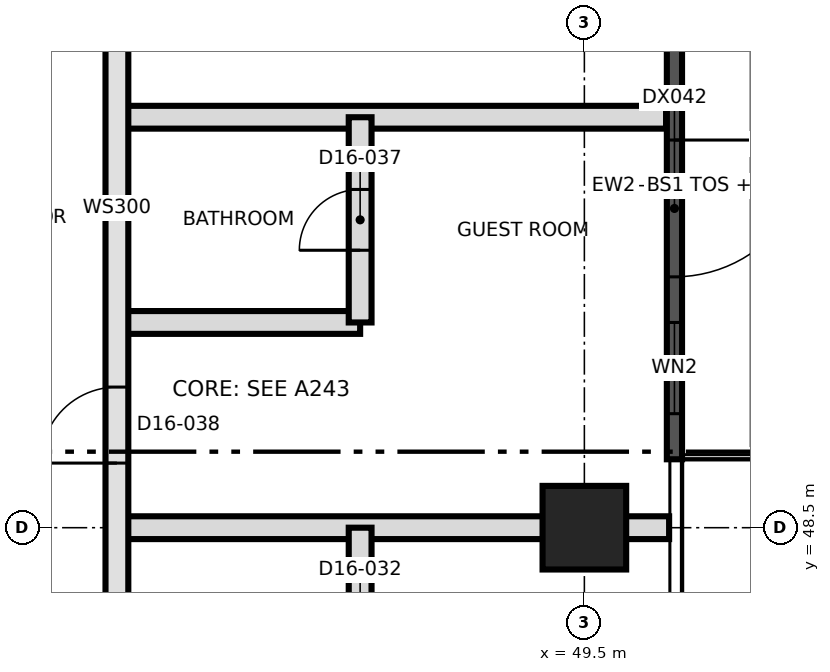
"""IFC4 building model, lengths in metres.
Left out: names, types, materials, properties, quantities, classifications, styles, units other than length and angle.
Written with IfcOpenShell. Run it as: python <this file> out.ifc"""

import sys

from ifc_helpers import new_model, si_unit, direction, frame, frame_2d, origin, origin_2d, place, context, subcontext, project, spatial, rectangle, extrude, element, fill, save


model = new_model("IFC4")
c1 = context("Model", 3, precision=1e-05, world=origin(), true_north=direction((0.0, 1.0)))
c2 = subcontext(c1, "Body", "Model", "MODEL_VIEW")
j1 = project(units=[si_unit("LENGTHUNIT", "METRE"), si_unit("PLANEANGLEUNIT", "RADIAN")], contexts=[c1])
p1 = place(None, origin())
s1 = spatial("IfcSite", under=j1, at=p1, CompositionType="ELEMENT")
p2 = place(p1, origin())
s2 = spatial("IfcBuilding", under=s1, at=p2, CompositionType="ELEMENT")
p3 = place(p2, frame((0.0, 0.0, 164.4)))
s3 = spatial("IfcBuildingStorey", under=s2, at=p3, CompositionType="ELEMENT", Elevation=164.4)
p4 = place(p3, frame((49.5, 48.5, 0.0), z_axis=(0.0, 0.0, 1.0), x_axis=(1.0, 0.0, 0.0)))
e1 = element("IfcColumn", 1, at=p4, inside=s3, PredefinedType="COLUMN", context=c2, shape_type="SweptSolid", body=[
    extrude(rectangle(XDim=1.1, YDim=1.1, at=origin_2d()), origin(), (0.0, 0.0, 1.0), 3.7),
])
p5 = place(p3, frame((50.685, 56.6, 0.0), z_axis=(0.0, 0.0, 1.0), x_axis=(0.0, -1.0, 0.0)))
e2 = element("IfcWall", 2, at=p5, inside=s3, PredefinedType="SOLIDWALL", context=c2, shape_type="SweptSolid", body=[
    extrude(rectangle(XDim=7.2, YDim=0.2, at=frame_2d((3.6, 0.0))), origin(), (0.0, 0.0, 1.0), 3.4),
])
p6 = place(p5, frame((3.0, 0.0, 0.0)))
e3 = element("IfcOpeningElement", 3, at=p6, cuts=e2, PredefinedType="OPENING", context=c2, shape_type="SweptSolid", body=[
    extrude(rectangle(XDim=1.8, YDim=2.4, at=frame_2d((0.9, 1.2))), frame((0.0, 0.11, 0.0), z_axis=(0.0, -1.0, 0.0), x_axis=(1.0, 0.0, 0.0)), (0.0, 0.0, 1.0), 0.22),
])
p7 = place(p5, frame((5.4, 0.0, 0.9)))
e4 = element("IfcOpeningElement", 4, at=p7, cuts=e2, PredefinedType="OPENING", context=c2, shape_type="SweptSolid", body=[
    extrude(rectangle(XDim=1.2, YDim=2.1, at=frame_2d((0.6, 1.05))), frame((0.0, 0.11, 0.0), z_axis=(0.0, -1.0, 0.0), x_axis=(1.0, 0.0, 0.0)), (0.0, 0.0, 1.0), 0.22),
])
p8 = place(p5, frame((0.6, 0.0, 0.9)))
e5 = element("IfcOpeningElement", 5, at=p8, cuts=e2, PredefinedType="OPENING", context=c2, shape_type="SweptSolid", body=[
    extrude(rectangle(XDim=1.2, YDim=2.1, at=frame_2d((0.6, 1.05))), frame((0.0, 0.11, 0.0), z_axis=(0.0, -1.0, 0.0), x_axis=(1.0, 0.0, 0.0)), (0.0, 0.0, 1.0), 0.22),
])
p9 = place(p3, frame((43.35, 48.5, 0.0), z_axis=(0.0, 0.0, 1.0), x_axis=(1.0, 0.0, 0.0)))
e6 = element("IfcWall", 6, at=p9, inside=s3, PredefinedType="PARTITIONING", context=c2, shape_type="SweptSolid", body=[
    extrude(rectangle(XDim=7.265, YDim=0.3, at=frame_2d((3.632, 0.0))), origin(), (0.0, 0.0, 1.0), 3.4),
])
p10 = place(p3, frame((43.35, 51.2, 0.0), z_axis=(0.0, 0.0, 1.0), x_axis=(1.0, 0.0, 0.0)))
e7 = element("IfcWall", 7, at=p10, inside=s3, PredefinedType="PARTITIONING", context=c2, shape_type="SweptSolid", body=[
    extrude(rectangle(XDim=3.2, YDim=0.3, at=frame_2d((1.6, 0.0))), origin(), (0.0, 0.0, 1.0), 3.4),
])
p11 = place(p3, frame((43.35, 53.9, 0.0), z_axis=(0.0, 0.0, 1.0), x_axis=(1.0, 0.0, 0.0)))
e8 = element("IfcWall", 8, at=p11, inside=s3, PredefinedType="PARTITIONING", context=c2, shape_type="SweptSolid", body=[
    extrude(rectangle(XDim=7.225, YDim=0.3, at=frame_2d((3.612, 0.0))), origin(), (0.0, 0.0, 1.0), 3.4),
])
p12 = place(p3, frame((43.35, 39.65, 0.0), z_axis=(0.0, 0.0, 1.0), x_axis=(0.0, 1.0, 0.0)))
e9 = element("IfcWall", 9, at=p12, inside=s3, PredefinedType="SOLIDWALL", context=c2, shape_type="SweptSolid", body=[
    extrude(rectangle(XDim=26.1, YDim=0.3, at=frame_2d((13.05, 0.0))), origin(), (0.0, 0.0, 1.0), 3.4),
])
p13 = place(p12, frame((0.985, 0.0, 0.0)))
e10 = element("IfcOpeningElement", 10, at=p13, cuts=e9, PredefinedType="OPENING", context=c2, shape_type="SweptSolid", body=[
    extrude(rectangle(XDim=1.2, YDim=2.1, at=frame_2d((0.6, 1.05))), frame((0.0, 0.16, 0.0), z_axis=(0.0, -1.0, 0.0), x_axis=(1.0, 0.0, 0.0)), (0.0, 0.0, 1.0), 0.32),
])
p14 = place(p12, frame((4.235, 0.0, 0.0)))
e11 = element("IfcOpeningElement", 11, at=p14, cuts=e9, PredefinedType="OPENING", context=c2, shape_type="SweptSolid", body=[
    extrude(rectangle(XDim=1.0, YDim=2.1, at=frame_2d((0.5, 1.05))), frame((0.0, 0.16, 0.0), z_axis=(0.0, -1.0, 0.0), x_axis=(1.0, 0.0, 0.0)), (0.0, 0.0, 1.0), 0.32),
])
p15 = place(p12, frame((9.7, 0.0, 0.0)))
e12 = element("IfcOpeningElement", 12, at=p15, cuts=e9, PredefinedType="OPENING", context=c2, shape_type="SweptSolid", body=[
    extrude(rectangle(XDim=1.0, YDim=2.1, at=frame_2d((0.5, 1.05))), frame((0.0, 0.16, 0.0), z_axis=(0.0, -1.0, 0.0), x_axis=(1.0, 0.0, 0.0)), (0.0, 0.0, 1.0), 0.32),
])
p16 = place(p12, frame((15.55, 0.0, 0.0)))
e13 = element("IfcOpeningElement", 13, at=p16, cuts=e9, PredefinedType="OPENING", context=c2, shape_type="SweptSolid", body=[
    extrude(rectangle(XDim=1.0, YDim=2.1, at=frame_2d((0.5, 1.05))), frame((0.0, 0.16, 0.0), z_axis=(0.0, -1.0, 0.0), x_axis=(1.0, 0.0, 0.0)), (0.0, 0.0, 1.0), 0.32),
])
p17 = place(p12, frame((19.85, 0.0, 0.0)))
e14 = element("IfcOpeningElement", 14, at=p17, cuts=e9, PredefinedType="OPENING", context=c2, shape_type="SweptSolid", body=[
    extrude(rectangle(XDim=1.0, YDim=2.4, at=frame_2d((0.5, 1.2))), frame((0.0, 0.16, 0.0), z_axis=(0.0, -1.0, 0.0), x_axis=(1.0, 0.0, 0.0)), (0.0, 0.0, 1.0), 0.32),
])
p18 = place(p3, frame((46.55, 45.8, 0.0), z_axis=(0.0, 0.0, 1.0), x_axis=(0.0, 1.0, 0.0)))
e15 = element("IfcWall", 15, at=p18, inside=s3, PredefinedType="PARTITIONING", context=c2, shape_type="SweptSolid", body=[
    extrude(rectangle(XDim=2.7, YDim=0.3, at=frame_2d((1.35, 0.0))), origin(), (0.0, 0.0, 1.0), 3.4),
])
p19 = place(p18, frame((0.95, 0.0, 0.0)))
e16 = element("IfcOpeningElement", 16, at=p19, cuts=e15, PredefinedType="OPENING", context=c2, shape_type="SweptSolid", body=[
    extrude(rectangle(XDim=0.8, YDim=2.1, at=frame_2d((0.4, 1.05))), frame((0.0, 0.16, 0.0), z_axis=(0.0, -1.0, 0.0), x_axis=(1.0, 0.0, 0.0)), (0.0, 0.0, 1.0), 0.32),
])
p20 = place(p3, frame((46.55, 51.2, 0.0), z_axis=(0.0, 0.0, 1.0), x_axis=(0.0, 1.0, 0.0)))
e17 = element("IfcWall", 17, at=p20, inside=s3, PredefinedType="PARTITIONING", context=c2, shape_type="SweptSolid", body=[
    extrude(rectangle(XDim=2.7, YDim=0.3, at=frame_2d((1.35, 0.0))), origin(), (0.0, 0.0, 1.0), 3.4),
])
p21 = place(p20, frame((0.95, 0.0, 0.0)))
e18 = element("IfcOpeningElement", 18, at=p21, cuts=e17, PredefinedType="OPENING", context=c2, shape_type="SweptSolid", body=[
    extrude(rectangle(XDim=0.8, YDim=2.1, at=frame_2d((0.4, 1.05))), frame((0.0, 0.16, 0.0), z_axis=(0.0, -1.0, 0.0), x_axis=(1.0, 0.0, 0.0)), (0.0, 0.0, 1.0), 0.32),
])
p22 = place(p6, origin())
e19 = element("IfcDoor", 19, at=p22, inside=s3, OperationType="SINGLE_SWING_LEFT", PredefinedType="DOOR", context=c2, shape_type="SweptSolid", body=[
    extrude(rectangle(XDim=1.8, YDim=2.4, at=frame_2d((0.9, 1.2))), frame((0.0, 0.025, 0.0), z_axis=(0.0, -1.0, 0.0), x_axis=(1.0, 0.0, 0.0)), (0.0, 0.0, 1.0), 0.05),
])
fill(e3, e19)
p23 = place(p7, origin())
e20 = element("IfcWindow", 20, at=p23, inside=s3, PartitioningType="SINGLE_PANEL", PredefinedType="WINDOW", context=c2, shape_type="SweptSolid", body=[
    extrude(rectangle(XDim=1.2, YDim=2.1, at=frame_2d((0.6, 1.05))), frame((0.0, 0.03, 0.0), z_axis=(0.0, -1.0, 0.0), x_axis=(1.0, 0.0, 0.0)), (0.0, 0.0, 1.0), 0.06),
])
fill(e4, e20)
p24 = place(p21, origin())
e21 = element("IfcDoor", 21, at=p24, inside=s3, OperationType="SINGLE_SWING_LEFT", PredefinedType="DOOR", context=c2, shape_type="SweptSolid", body=[
    extrude(rectangle(XDim=0.8, YDim=2.1, at=frame_2d((0.4, 1.05))), frame((0.0, 0.025, 0.0), z_axis=(0.0, -1.0, 0.0), x_axis=(1.0, 0.0, 0.0)), (0.0, 0.0, 1.0), 0.05),
])
fill(e18, e21)
p25 = place(p15, origin())
e22 = element("IfcDoor", 22, at=p25, inside=s3, OperationType="SINGLE_SWING_RIGHT", PredefinedType="DOOR", context=c2, shape_type="SweptSolid", body=[
    extrude(rectangle(XDim=1.0, YDim=2.1, at=frame_2d((0.5, 1.05))), frame((0.0, 0.025, 0.0), z_axis=(0.0, -1.0, 0.0), x_axis=(1.0, 0.0, 0.0)), (0.0, 0.0, 1.0), 0.05),
])
fill(e12, e22)
save(model, sys.argv[1])
